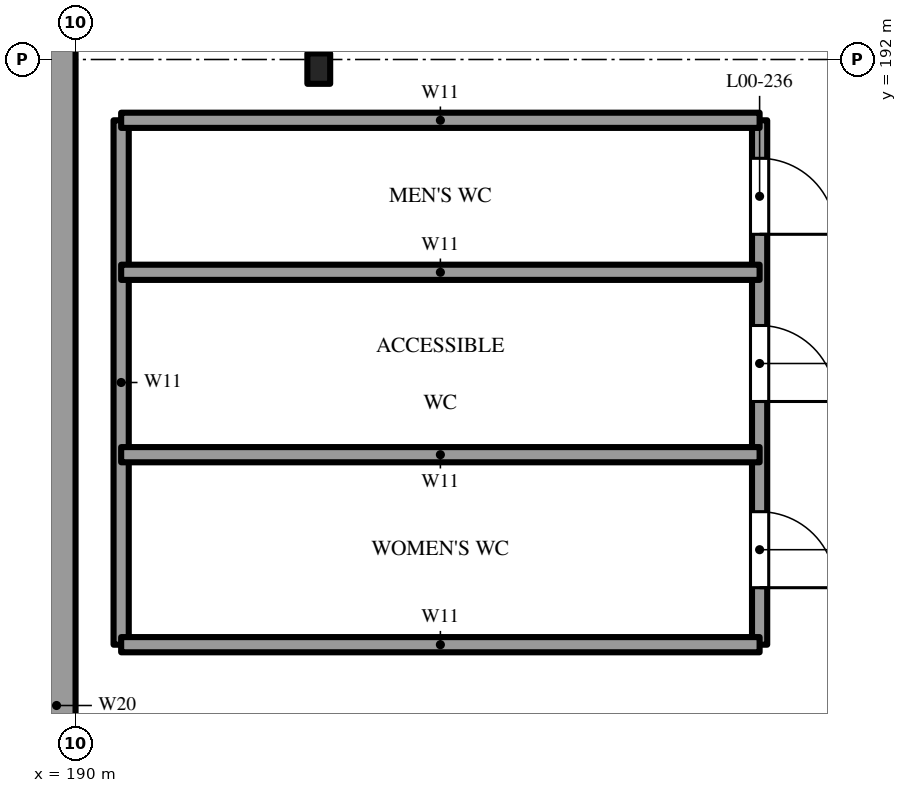
"""IFC4 building model, lengths in metres.
Left out: names, types, materials, properties, quantities, classifications, styles, units other than length and angle.
Written with IfcOpenShell. Run it as: python <this file> out.ifc"""

import sys

from ifc_helpers import new_model, si_unit, direction, frame, frame_2d, origin, origin_2d, place, context, subcontext, project, spatial, rectangle, i_section, extrude, element, fill, save


model = new_model("IFC4")
c1 = context("Model", 3, precision=1e-05, world=origin(), true_north=direction((0.0, 1.0)))
c2 = subcontext(c1, "Body", "Model", "MODEL_VIEW")
j1 = project(units=[si_unit("LENGTHUNIT", "METRE"), si_unit("PLANEANGLEUNIT", "RADIAN")], contexts=[c1])
p1 = place(None, origin())
s1 = spatial("IfcSite", under=j1, at=p1, CompositionType="ELEMENT")
p2 = place(p1, origin())
s2 = spatial("IfcBuilding", under=s1, at=p2, CompositionType="ELEMENT")
p3 = place(p2, origin())
s3 = spatial("IfcBuildingStorey", under=s2, at=p3, CompositionType="ELEMENT", Elevation=0.0)
p4 = place(p3, frame((229.664, 156.311, -0.3), z_axis=(0.0, 0.0, 1.0), x_axis=(-0.587784977279, 0.809017194184, 0.0)))
e1 = element("IfcWall", 1, at=p4, inside=s3, PredefinedType="SOLIDWALL", context=c2, shape_type="SweptSolid", body=[
    extrude(rectangle(XDim=53.5, YDim=0.4, at=frame_2d((26.75, 0.0))), origin(), (0.0, 0.0, 1.0), 7.5),
])
p5 = place(p4, frame((13.3, 0.0, 0.3)))
e2 = element("IfcOpeningElement", 2, at=p5, cuts=e1, PredefinedType="OPENING", context=c2, shape_type="SweptSolid", body=[
    extrude(rectangle(XDim=2.4, YDim=2.4, at=frame_2d((1.2, 1.2))), frame((0.0, 0.21, 0.0), z_axis=(0.0, -1.0, 0.0), x_axis=(1.0, 0.0, 0.0)), (0.0, 0.0, 1.0), 0.42),
])
p6 = place(p4, frame((16.8, 0.0, 0.3)))
e3 = element("IfcOpeningElement", 3, at=p6, cuts=e1, PredefinedType="OPENING", context=c2, shape_type="SweptSolid", body=[
    extrude(rectangle(XDim=2.4, YDim=2.4, at=frame_2d((1.2, 1.2))), frame((0.0, 0.21, 0.0), z_axis=(0.0, -1.0, 0.0), x_axis=(1.0, 0.0, 0.0)), (0.0, 0.0, 1.0), 0.42),
])
p7 = place(p4, frame((20.3, 0.0, 0.3)))
e4 = element("IfcOpeningElement", 4, at=p7, cuts=e1, PredefinedType="OPENING", context=c2, shape_type="SweptSolid", body=[
    extrude(rectangle(XDim=2.4, YDim=2.4, at=frame_2d((1.2, 1.2))), frame((0.0, 0.21, 0.0), z_axis=(0.0, -1.0, 0.0), x_axis=(1.0, 0.0, 0.0)), (0.0, 0.0, 1.0), 0.42),
])
p8 = place(p4, frame((23.8, 0.0, 0.3)))
e5 = element("IfcOpeningElement", 5, at=p8, cuts=e1, PredefinedType="OPENING", context=c2, shape_type="SweptSolid", body=[
    extrude(rectangle(XDim=2.4, YDim=2.4, at=frame_2d((1.2, 1.2))), frame((0.0, 0.21, 0.0), z_axis=(0.0, -1.0, 0.0), x_axis=(1.0, 0.0, 0.0)), (0.0, 0.0, 1.0), 0.42),
])
p9 = place(p4, frame((27.3, 0.0, 0.3)))
e6 = element("IfcOpeningElement", 6, at=p9, cuts=e1, PredefinedType="OPENING", context=c2, shape_type="SweptSolid", body=[
    extrude(rectangle(XDim=2.4, YDim=2.4, at=frame_2d((1.2, 1.2))), frame((0.0, 0.21, 0.0), z_axis=(0.0, -1.0, 0.0), x_axis=(1.0, 0.0, 0.0)), (0.0, 0.0, 1.0), 0.42),
])
p10 = place(p4, frame((30.8, 0.0, 0.3)))
e7 = element("IfcOpeningElement", 7, at=p10, cuts=e1, PredefinedType="OPENING", context=c2, shape_type="SweptSolid", body=[
    extrude(rectangle(XDim=2.4, YDim=2.4, at=frame_2d((1.2, 1.2))), frame((0.0, 0.21, 0.0), z_axis=(0.0, -1.0, 0.0), x_axis=(1.0, 0.0, 0.0)), (0.0, 0.0, 1.0), 0.42),
])
p11 = place(p4, frame((34.3, 0.0, 0.3)))
e8 = element("IfcOpeningElement", 8, at=p11, cuts=e1, PredefinedType="OPENING", context=c2, shape_type="SweptSolid", body=[
    extrude(rectangle(XDim=2.4, YDim=2.4, at=frame_2d((1.2, 1.2))), frame((0.0, 0.21, 0.0), z_axis=(0.0, -1.0, 0.0), x_axis=(1.0, 0.0, 0.0)), (0.0, 0.0, 1.0), 0.42),
])
p12 = place(p4, frame((37.8, 0.0, 0.3)))
e9 = element("IfcOpeningElement", 9, at=p12, cuts=e1, PredefinedType="OPENING", context=c2, shape_type="SweptSolid", body=[
    extrude(rectangle(XDim=2.4, YDim=2.4, at=frame_2d((1.2, 1.2))), frame((0.0, 0.21, 0.0), z_axis=(0.0, -1.0, 0.0), x_axis=(1.0, 0.0, 0.0)), (0.0, 0.0, 1.0), 0.42),
])
p13 = place(p3, frame((193.2, 191.88, -0.3), z_axis=(0.0, 0.0, 1.0), x_axis=(1.0, 0.0, 0.0)))
e10 = element("IfcColumn", 10, at=p13, inside=s3, PredefinedType="COLUMN", context=c2, shape_type="SweptSolid", body=[
    extrude(i_section(OverallWidth=0.3, OverallDepth=0.4, WebThickness=0.013, FlangeThickness=0.024, FilletRadius=0.027, at=origin_2d()), origin(), (0.0, 0.0, 1.0), 7.5),
])
p14 = place(p3, frame((189.75, 149.72, 0.0), z_axis=(0.0, 0.0, 1.0), x_axis=(0.0, 1.0, 0.0)))
e11 = element("IfcWall", 11, at=p14, inside=s3, PredefinedType="SOLIDWALL", context=c2, shape_type="SweptSolid", body=[
    extrude(rectangle(XDim=50.08, YDim=0.5, at=frame_2d((25.04, 0.0))), origin(), (0.0, 0.0, 1.0), 7.2),
])
p15 = place(p14, frame((7.58, 0.0, 0.0)))
e12 = element("IfcOpeningElement", 12, at=p15, cuts=e11, PredefinedType="OPENING", context=c2, shape_type="SweptSolid", body=[
    extrude(rectangle(XDim=2.4, YDim=2.4, at=frame_2d((1.2, 1.2))), frame((0.0, 0.26, 0.0), z_axis=(0.0, -1.0, 0.0), x_axis=(1.0, 0.0, 0.0)), (0.0, 0.0, 1.0), 0.52),
])
p16 = place(p14, frame((22.58, 0.0, 0.0)))
e13 = element("IfcOpeningElement", 13, at=p16, cuts=e11, PredefinedType="OPENING", context=c2, shape_type="SweptSolid", body=[
    extrude(rectangle(XDim=2.4, YDim=2.4, at=frame_2d((1.2, 1.2))), frame((0.0, 0.26, 0.0), z_axis=(0.0, -1.0, 0.0), x_axis=(1.0, 0.0, 0.0)), (0.0, 0.0, 1.0), 0.52),
])
p17 = place(p14, frame((42.58, 0.0, 0.0)))
e14 = element("IfcOpeningElement", 14, at=p17, cuts=e11, PredefinedType="OPENING", context=c2, shape_type="SweptSolid", body=[
    extrude(rectangle(XDim=2.4, YDim=2.4, at=frame_2d((1.2, 1.2))), frame((0.0, 0.26, 0.0), z_axis=(0.0, -1.0, 0.0), x_axis=(1.0, 0.0, 0.0)), (0.0, 0.0, 1.0), 0.52),
])
p18 = place(p3, frame((190.6, 184.3, 0.0), z_axis=(0.0, 0.0, 1.0), x_axis=(0.0, 1.0, 0.0)))
e15 = element("IfcWall", 15, at=p18, inside=s3, PredefinedType="SOLIDWALL", context=c2, shape_type="SweptSolid", body=[
    extrude(rectangle(XDim=6.9, YDim=0.2, at=frame_2d((3.45, 0.0))), origin(), (0.0, 0.0, 1.0), 3.2),
])
p19 = place(p3, frame((199.0, 184.3, 0.0), z_axis=(0.0, 0.0, 1.0), x_axis=(0.0, 1.0, 0.0)))
e16 = element("IfcWall", 16, at=p19, inside=s3, PredefinedType="SOLIDWALL", context=c2, shape_type="SweptSolid", body=[
    extrude(rectangle(XDim=6.9, YDim=0.2, at=frame_2d((3.45, 0.0))), origin(), (0.0, 0.0, 1.0), 3.2),
])
p20 = place(p19, frame((0.75, 0.0, 0.0)))
e17 = element("IfcOpeningElement", 17, at=p20, cuts=e16, PredefinedType="OPENING", context=c2, shape_type="SweptSolid", body=[
    extrude(rectangle(XDim=1.0, YDim=2.1, at=frame_2d((0.5, 1.05))), frame((0.0, 0.11, 0.0), z_axis=(0.0, -1.0, 0.0), x_axis=(1.0, 0.0, 0.0)), (0.0, 0.0, 1.0), 0.22),
])
p21 = place(p19, frame((3.2, 0.0, 0.0)))
e18 = element("IfcOpeningElement", 18, at=p21, cuts=e16, PredefinedType="OPENING", context=c2, shape_type="SweptSolid", body=[
    extrude(rectangle(XDim=1.0, YDim=2.1, at=frame_2d((0.5, 1.05))), frame((0.0, 0.11, 0.0), z_axis=(0.0, -1.0, 0.0), x_axis=(1.0, 0.0, 0.0)), (0.0, 0.0, 1.0), 0.22),
])
p22 = place(p19, frame((5.4, 0.0, 0.0)))
e19 = element("IfcOpeningElement", 19, at=p22, cuts=e16, PredefinedType="OPENING", context=c2, shape_type="SweptSolid", body=[
    extrude(rectangle(XDim=1.0, YDim=2.1, at=frame_2d((0.5, 1.05))), frame((0.0, 0.11, 0.0), z_axis=(0.0, -1.0, 0.0), x_axis=(1.0, 0.0, 0.0)), (0.0, 0.0, 1.0), 0.22),
])
for number, where, z_axis, x_axis in (
    (20, (190.6, 184.3, 0.0), (0.0, 0.0, 1.0), (1.0, 0.0, 0.0)),
    (21, (190.6, 186.8, 0.0), (0.0, 0.0, 1.0), (1.0, 0.0, 0.0)),
    (22, (190.6, 189.2, 0.0), (0.0, 0.0, 1.0), (1.0, 0.0, 0.0)),
    (23, (190.6, 191.2, 0.0), (0.0, 0.0, 1.0), (1.0, 0.0, 0.0)),
):
    element("IfcWall", number, at=place(p3, frame(where, z_axis=z_axis, x_axis=x_axis)), inside=s3, PredefinedType="SOLIDWALL", context=c2, shape_type="SweptSolid", body=[
        extrude(rectangle(XDim=8.4, YDim=0.2, at=frame_2d((4.2, 0.0))), origin(), (0.0, 0.0, 1.0), 3.2),
    ])
p23 = place(p20, frame((1.0, 0.0, 0.0), z_axis=(0.0, 0.0, 1.0), x_axis=(-1.0, 0.0, 0.0)))
e24 = element("IfcDoor", 24, at=p23, inside=s3, OperationType="SINGLE_SWING_RIGHT", PredefinedType="DOOR", context=c2, shape_type="SweptSolid", body=[
    extrude(rectangle(XDim=1.0, YDim=2.1, at=frame_2d((0.5, 1.05))), frame((0.0, 0.025, 0.0), z_axis=(0.0, -1.0, 0.0), x_axis=(1.0, 0.0, 0.0)), (0.0, 0.0, 1.0), 0.05),
])
fill(e17, e24)
p24 = place(p21, frame((1.0, 0.0, 0.0), z_axis=(0.0, 0.0, 1.0), x_axis=(-1.0, 0.0, 0.0)))
e25 = element("IfcDoor", 25, at=p24, inside=s3, OperationType="SINGLE_SWING_RIGHT", PredefinedType="DOOR", context=c2, shape_type="SweptSolid", body=[
    extrude(rectangle(XDim=1.0, YDim=2.1, at=frame_2d((0.5, 1.05))), frame((0.0, 0.025, 0.0), z_axis=(0.0, -1.0, 0.0), x_axis=(1.0, 0.0, 0.0)), (0.0, 0.0, 1.0), 0.05),
])
fill(e18, e25)
p25 = place(p22, frame((1.0, 0.0, 0.0), z_axis=(0.0, 0.0, 1.0), x_axis=(-1.0, 0.0, 0.0)))
e26 = element("IfcDoor", 26, at=p25, inside=s3, OperationType="SINGLE_SWING_RIGHT", PredefinedType="DOOR", context=c2, shape_type="SweptSolid", body=[
    extrude(rectangle(XDim=1.0, YDim=2.1, at=frame_2d((0.5, 1.05))), frame((0.0, 0.025, 0.0), z_axis=(0.0, -1.0, 0.0), x_axis=(1.0, 0.0, 0.0)), (0.0, 0.0, 1.0), 0.05),
])
fill(e19, e26)
save(model, sys.argv[1])
